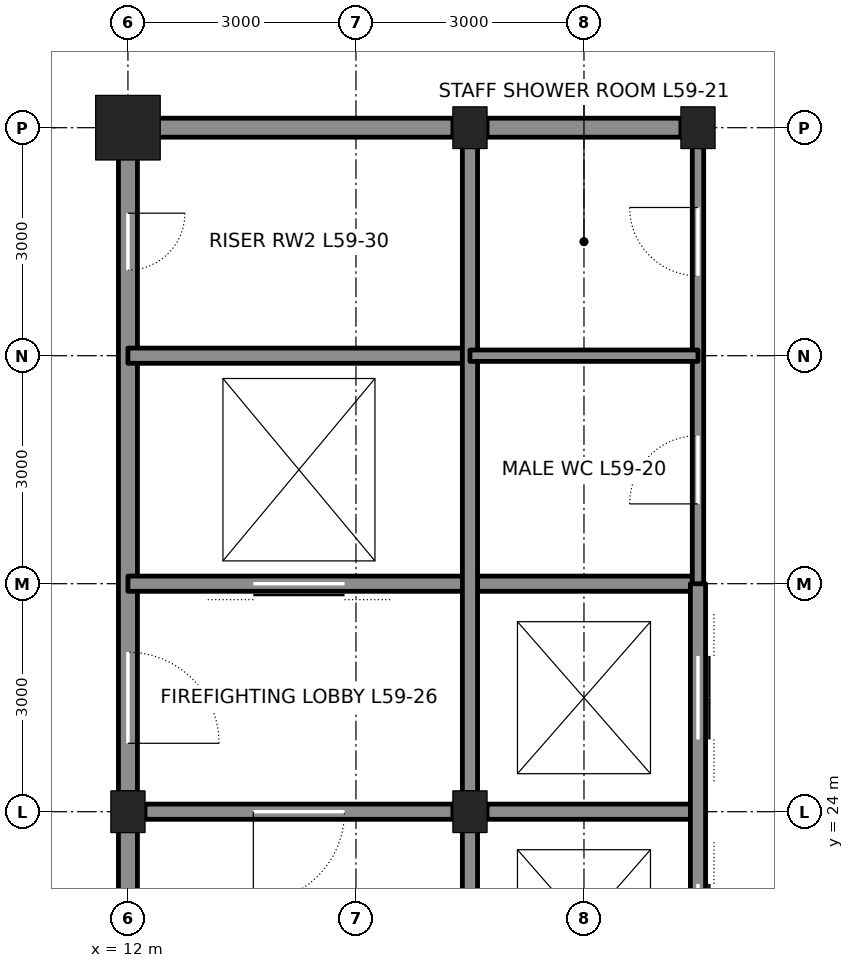
"""IFC4 building model, lengths in metres.
Left out: names, types, materials, properties, quantities, classifications, styles, units other than length and angle.
Written with IfcOpenShell. Run it as: python <this file> out.ifc"""

import sys

from ifc_helpers import new_model, si_unit, direction, frame, frame_2d, origin, origin_2d, place, context, subcontext, project, spatial, rectangle, hollow_rectangle, i_section, extrude, element, fill, save


model = new_model("IFC4")
c1 = context("Model", 3, precision=1e-05, world=origin(), true_north=direction((0.0, 1.0)))
c2 = subcontext(c1, "Body", "Model", "MODEL_VIEW")
j1 = project(units=[si_unit("LENGTHUNIT", "METRE"), si_unit("PLANEANGLEUNIT", "RADIAN")], contexts=[c1])
p1 = place(None, origin())
s1 = spatial("IfcSite", under=j1, at=p1, CompositionType="ELEMENT")
p2 = place(p1, origin())
s2 = spatial("IfcBuilding", under=s1, at=p2, CompositionType="ELEMENT")
p3 = place(p2, frame((0.0, 0.0, 266.4)))
s3 = spatial("IfcBuildingStorey", under=s2, at=p3, CompositionType="ELEMENT", Elevation=266.4)
p4 = place(p3, frame((12.0, 33.0, 0.0), z_axis=(0.0, 0.0, 1.0), x_axis=(1.0, 0.0, 0.0)))
e1 = element("IfcColumn", 1, at=p4, inside=s3, PredefinedType="COLUMN", context=c2, shape_type="SweptSolid", body=[
    extrude(hollow_rectangle(XDim=0.85, YDim=0.85, WallThickness=0.085, at=origin_2d()), origin(), (0.0, 0.0, 1.0), 4.2),
])
for number, where, z_axis, x_axis in (
    (2, (16.5, 33.0, 0.0), (0.0, 0.0, 1.0), (1.0, 0.0, 0.0)),
    (3, (19.5, 33.0, 0.0), (0.0, 0.0, 1.0), (1.0, 0.0, 0.0)),
    (4, (12.0, 24.0, 0.0), (0.0, 0.0, 1.0), (1.0, 0.0, 0.0)),
    (5, (16.5, 24.0, 0.0), (0.0, 0.0, 1.0), (1.0, 0.0, 0.0)),
):
    element("IfcColumn", number, at=place(p3, frame(where, z_axis=z_axis, x_axis=x_axis)), inside=s3, PredefinedType="COLUMN", context=c2, shape_type="SweptSolid", body=[
        extrude(i_section(OverallWidth=0.449, OverallDepth=0.549, WebThickness=0.072, FlangeThickness=0.115, at=origin_2d()), origin(), (0.0, 0.0, 1.0), 4.2),
    ])
p5 = place(p3, frame((12.0, 21.25, 0.0), z_axis=(0.0, 0.0, 1.0), x_axis=(0.0, 1.0, 0.0)))
e6 = element("IfcWall", 6, at=p5, inside=s3, PredefinedType="SOLIDWALL", context=c2, shape_type="SweptSolid", body=[
    extrude(rectangle(XDim=2.5, YDim=0.25, at=frame_2d((1.25, 0.0))), origin(), (0.0, 0.0, 1.0), 3.113),
])
p6 = place(p3, frame((12.0, 24.25, 0.0), z_axis=(0.0, 0.0, 1.0), x_axis=(0.0, 1.0, 0.0)))
e7 = element("IfcWall", 7, at=p6, inside=s3, PredefinedType="SOLIDWALL", context=c2, shape_type="SweptSolid", body=[
    extrude(rectangle(XDim=8.5, YDim=0.25, at=frame_2d((4.25, 0.0))), origin(), (0.0, 0.0, 1.0), 3.113),
])
p7 = place(p6, frame((0.65, 0.0, 0.0)))
e8 = element("IfcOpeningElement", 8, at=p7, cuts=e7, PredefinedType="OPENING", context=c2, shape_type="SweptSolid", body=[
    extrude(rectangle(XDim=1.2, YDim=2.1, at=frame_2d((0.6, 1.05))), frame((0.0, 0.135, 0.0), z_axis=(0.0, -1.0, 0.0), x_axis=(1.0, 0.0, 0.0)), (0.0, 0.0, 1.0), 0.27),
])
p8 = place(p6, frame((6.875, 0.0, 0.0)))
e9 = element("IfcOpeningElement", 9, at=p8, cuts=e7, PredefinedType="OPENING", context=c2, shape_type="SweptSolid", body=[
    extrude(rectangle(XDim=0.75, YDim=2.1, at=frame_2d((0.375, 1.05))), frame((0.0, 0.135, 0.0), z_axis=(0.0, -1.0, 0.0), x_axis=(1.0, 0.0, 0.0)), (0.0, 0.0, 1.0), 0.27),
])
p9 = place(p3, frame((12.225, 24.0, 0.0), z_axis=(0.0, 0.0, 1.0), x_axis=(1.0, 0.0, 0.0)))
e10 = element("IfcWall", 10, at=p9, inside=s3, PredefinedType="SOLIDWALL", context=c2, shape_type="SweptSolid", body=[
    extrude(rectangle(XDim=4.05, YDim=0.2, at=frame_2d((2.025, 0.0))), origin(), (0.0, 0.0, 1.0), 3.09),
])
p10 = place(p9, frame((1.425, 0.0, 0.0)))
e11 = element("IfcOpeningElement", 11, at=p10, cuts=e10, PredefinedType="OPENING", context=c2, shape_type="SweptSolid", body=[
    extrude(rectangle(XDim=1.2, YDim=2.1, at=frame_2d((0.6, 1.05))), frame((0.0, 0.11, 0.0), z_axis=(0.0, -1.0, 0.0), x_axis=(1.0, 0.0, 0.0)), (0.0, 0.0, 1.0), 0.22),
])
p11 = place(p3, frame((16.725, 24.0, 0.0), z_axis=(0.0, 0.0, 1.0), x_axis=(1.0, 0.0, 0.0)))
e12 = element("IfcWall", 12, at=p11, inside=s3, PredefinedType="SOLIDWALL", context=c2, shape_type="SweptSolid", body=[
    extrude(rectangle(XDim=2.775, YDim=0.2, at=frame_2d((1.388, 0.0))), origin(), (0.0, 0.0, 1.0), 3.09),
])
p12 = place(p3, frame((12.0, 27.0, 0.0), z_axis=(0.0, 0.0, 1.0), x_axis=(1.0, 0.0, 0.0)))
e13 = element("IfcWall", 13, at=p12, inside=s3, PredefinedType="SOLIDWALL", context=c2, shape_type="SweptSolid", body=[
    extrude(rectangle(XDim=7.5, YDim=0.2, at=frame_2d((3.75, 0.0))), origin(), (0.0, 0.0, 1.0), 4.04),
])
p13 = place(p12, frame((1.65, 0.0, 0.0)))
e14 = element("IfcOpeningElement", 14, at=p13, cuts=e13, PredefinedType="OPENING", context=c2, shape_type="SweptSolid", body=[
    extrude(rectangle(XDim=1.2, YDim=2.1, at=frame_2d((0.6, 1.05))), frame((0.0, 0.11, 0.0), z_axis=(0.0, -1.0, 0.0), x_axis=(1.0, 0.0, 0.0)), (0.0, 0.0, 1.0), 0.22),
])
p14 = place(p3, frame((12.0, 30.0, 0.0), z_axis=(0.0, 0.0, 1.0), x_axis=(1.0, 0.0, 0.0)))
e15 = element("IfcWall", 15, at=p14, inside=s3, PredefinedType="SOLIDWALL", context=c2, shape_type="SweptSolid", body=[
    extrude(rectangle(XDim=4.5, YDim=0.2, at=frame_2d((2.25, 0.0))), origin(), (0.0, 0.0, 1.0), 4.04),
])
p15 = place(p3, frame((12.25, 33.0, 0.0), z_axis=(0.0, 0.0, 1.0), x_axis=(1.0, 0.0, 0.0)))
e16 = element("IfcWall", 16, at=p15, inside=s3, PredefinedType="SOLIDWALL", context=c2, shape_type="SweptSolid", body=[
    extrude(rectangle(XDim=4.025, YDim=0.25, at=frame_2d((2.013, 0.0))), origin(), (0.0, 0.0, 1.0), 3.182),
])
p16 = place(p3, frame((16.725, 33.0, 0.0), z_axis=(0.0, 0.0, 1.0), x_axis=(1.0, 0.0, 0.0)))
e17 = element("IfcWall", 17, at=p16, inside=s3, PredefinedType="SOLIDWALL", context=c2, shape_type="SweptSolid", body=[
    extrude(rectangle(XDim=2.55, YDim=0.25, at=frame_2d((1.275, 0.0))), origin(), (0.0, 0.0, 1.0), 3.182),
])
p17 = place(p3, frame((16.5, 21.25, 0.0), z_axis=(0.0, 0.0, 1.0), x_axis=(0.0, 1.0, 0.0)))
e18 = element("IfcWall", 18, at=p17, inside=s3, PredefinedType="SOLIDWALL", context=c2, shape_type="SweptSolid", body=[
    extrude(rectangle(XDim=2.5, YDim=0.2, at=frame_2d((1.25, 0.0))), origin(), (0.0, 0.0, 1.0), 3.113),
])
p18 = place(p3, frame((16.5, 24.25, 0.0), z_axis=(0.0, 0.0, 1.0), x_axis=(0.0, 1.0, 0.0)))
e19 = element("IfcWall", 19, at=p18, inside=s3, PredefinedType="SOLIDWALL", context=c2, shape_type="SweptSolid", body=[
    extrude(rectangle(XDim=8.5, YDim=0.2, at=frame_2d((4.25, 0.0))), origin(), (0.0, 0.0, 1.0), 3.113),
])
p19 = place(p3, frame((19.5, 15.0, 0.0), z_axis=(0.0, 0.0, 1.0), x_axis=(0.0, 1.0, 0.0)))
e20 = element("IfcWall", 20, at=p19, inside=s3, PredefinedType="SOLIDWALL", context=c2, shape_type="SweptSolid", body=[
    extrude(rectangle(XDim=12.0, YDim=0.2, at=frame_2d((6.0, 0.0))), origin(), (0.0, 0.0, 1.0), 3.065),
])
p20 = place(p19, frame((0.95, 0.0, 0.0)))
e21 = element("IfcOpeningElement", 21, at=p20, cuts=e20, PredefinedType="OPENING", context=c2, shape_type="SweptSolid", body=[
    extrude(rectangle(XDim=1.1, YDim=2.1, at=frame_2d((0.55, 1.05))), frame((0.0, 0.11, 0.0), z_axis=(0.0, -1.0, 0.0), x_axis=(1.0, 0.0, 0.0)), (0.0, 0.0, 1.0), 0.22),
])
p21 = place(p19, frame((3.95, 0.0, 0.0)))
e22 = element("IfcOpeningElement", 22, at=p21, cuts=e20, PredefinedType="OPENING", context=c2, shape_type="SweptSolid", body=[
    extrude(rectangle(XDim=1.1, YDim=2.1, at=frame_2d((0.55, 1.05))), frame((0.0, 0.11, 0.0), z_axis=(0.0, -1.0, 0.0), x_axis=(1.0, 0.0, 0.0)), (0.0, 0.0, 1.0), 0.22),
])
p22 = place(p19, frame((6.95, 0.0, 0.0)))
e23 = element("IfcOpeningElement", 23, at=p22, cuts=e20, PredefinedType="OPENING", context=c2, shape_type="SweptSolid", body=[
    extrude(rectangle(XDim=1.1, YDim=2.1, at=frame_2d((0.55, 1.05))), frame((0.0, 0.11, 0.0), z_axis=(0.0, -1.0, 0.0), x_axis=(1.0, 0.0, 0.0)), (0.0, 0.0, 1.0), 0.22),
])
p23 = place(p19, frame((9.95, 0.0, 0.0)))
e24 = element("IfcOpeningElement", 24, at=p23, cuts=e20, PredefinedType="OPENING", context=c2, shape_type="SweptSolid", body=[
    extrude(rectangle(XDim=1.1, YDim=2.1, at=frame_2d((0.55, 1.05))), frame((0.0, 0.11, 0.0), z_axis=(0.0, -1.0, 0.0), x_axis=(1.0, 0.0, 0.0)), (0.0, 0.0, 1.0), 0.22),
])
p24 = place(p3, frame((19.5, 27.0, 0.0), z_axis=(0.0, 0.0, 1.0), x_axis=(0.0, 1.0, 0.0)))
e25 = element("IfcWall", 25, at=p24, inside=s3, PredefinedType="PARTITIONING", context=c2, shape_type="SweptSolid", body=[
    extrude(rectangle(XDim=5.75, YDim=0.15, at=frame_2d((2.875, 0.0))), origin(), (0.0, 0.0, 1.0), 3.065),
])
p25 = place(p24, frame((1.05, 0.0, 0.0)))
e26 = element("IfcOpeningElement", 26, at=p25, cuts=e25, PredefinedType="OPENING", context=c2, shape_type="SweptSolid", body=[
    extrude(rectangle(XDim=0.9, YDim=2.1, at=frame_2d((0.45, 1.05))), frame((0.0, 0.085, 0.0), z_axis=(0.0, -1.0, 0.0), x_axis=(1.0, 0.0, 0.0)), (0.0, 0.0, 1.0), 0.17),
])
p26 = place(p24, frame((4.05, 0.0, 0.0)))
e27 = element("IfcOpeningElement", 27, at=p26, cuts=e25, PredefinedType="OPENING", context=c2, shape_type="SweptSolid", body=[
    extrude(rectangle(XDim=0.9, YDim=2.1, at=frame_2d((0.45, 1.05))), frame((0.0, 0.085, 0.0), z_axis=(0.0, -1.0, 0.0), x_axis=(1.0, 0.0, 0.0)), (0.0, 0.0, 1.0), 0.17),
])
p27 = place(p3, frame((16.5, 30.0, 0.0), z_axis=(0.0, 0.0, 1.0), x_axis=(1.0, 0.0, 0.0)))
e28 = element("IfcWall", 28, at=p27, inside=s3, PredefinedType="PARTITIONING", context=c2, shape_type="SweptSolid", body=[
    extrude(rectangle(XDim=3.0, YDim=0.15, at=frame_2d((1.5, 0.0))), origin(), (0.0, 0.0, 1.0), 4.04),
])
p28 = place(p10, frame((1.2, 0.0, 0.0), z_axis=(0.0, 0.0, 1.0), x_axis=(-1.0, 0.0, 0.0)))
e29 = element("IfcDoor", 29, at=p28, inside=s3, OperationType="SINGLE_SWING_RIGHT", PredefinedType="DOOR", context=c2, shape_type="SweptSolid", body=[
    extrude(rectangle(XDim=1.2, YDim=2.1, at=frame_2d((0.6, 1.05))), frame((0.0, 0.025, 0.0), z_axis=(0.0, -1.0, 0.0), x_axis=(1.0, 0.0, 0.0)), (0.0, 0.0, 1.0), 0.05),
])
fill(e11, e29)
p29 = place(p7, frame((1.2, 0.0, 0.0), z_axis=(0.0, 0.0, 1.0), x_axis=(-1.0, 0.0, 0.0)))
e30 = element("IfcDoor", 30, at=p29, inside=s3, OperationType="SINGLE_SWING_RIGHT", PredefinedType="DOOR", context=c2, shape_type="SweptSolid", body=[
    extrude(rectangle(XDim=1.2, YDim=2.1, at=frame_2d((0.6, 1.05))), frame((0.0, 0.025, 0.0), z_axis=(0.0, -1.0, 0.0), x_axis=(1.0, 0.0, 0.0)), (0.0, 0.0, 1.0), 0.05),
])
fill(e8, e30)
p30 = place(p13, origin())
e31 = element("IfcDoor", 31, at=p30, inside=s3, OperationType="DOUBLE_DOOR_SLIDING", PredefinedType="DOOR", context=c2, shape_type="SweptSolid", body=[
    extrude(rectangle(XDim=1.2, YDim=2.1, at=frame_2d((0.6, 1.05))), frame((0.0, 0.025, 0.0), z_axis=(0.0, -1.0, 0.0), x_axis=(1.0, 0.0, 0.0)), (0.0, 0.0, 1.0), 0.05),
])
fill(e14, e31)
p31 = place(p8, frame((0.75, 0.0, 0.0), z_axis=(0.0, 0.0, 1.0), x_axis=(-1.0, 0.0, 0.0)))
e32 = element("IfcDoor", 32, at=p31, inside=s3, OperationType="SINGLE_SWING_LEFT", PredefinedType="DOOR", context=c2, shape_type="SweptSolid", body=[
    extrude(rectangle(XDim=0.75, YDim=2.1, at=frame_2d((0.375, 1.05))), frame((0.0, 0.025, 0.0), z_axis=(0.0, -1.0, 0.0), x_axis=(1.0, 0.0, 0.0)), (0.0, 0.0, 1.0), 0.05),
])
fill(e9, e32)
p32 = place(p25, origin())
e33 = element("IfcDoor", 33, at=p32, inside=s3, OperationType="SINGLE_SWING_LEFT", PredefinedType="DOOR", context=c2, shape_type="SweptSolid", body=[
    extrude(rectangle(XDim=0.9, YDim=2.1, at=frame_2d((0.45, 1.05))), frame((0.0, 0.025, 0.0), z_axis=(0.0, -1.0, 0.0), x_axis=(1.0, 0.0, 0.0)), (0.0, 0.0, 1.0), 0.05),
])
fill(e26, e33)
p33 = place(p26, origin())
e34 = element("IfcDoor", 34, at=p33, inside=s3, OperationType="SINGLE_SWING_RIGHT", PredefinedType="DOOR", context=c2, shape_type="SweptSolid", body=[
    extrude(rectangle(XDim=0.9, YDim=2.1, at=frame_2d((0.45, 1.05))), frame((0.0, 0.025, 0.0), z_axis=(0.0, -1.0, 0.0), x_axis=(1.0, 0.0, 0.0)), (0.0, 0.0, 1.0), 0.05),
])
fill(e27, e34)
p34 = place(p22, origin())
e35 = element("IfcDoor", 35, at=p34, inside=s3, OperationType="DOUBLE_DOOR_SLIDING", PredefinedType="DOOR", context=c2, shape_type="SweptSolid", body=[
    extrude(rectangle(XDim=1.1, YDim=2.1, at=frame_2d((0.55, 1.05))), frame((0.0, 0.025, 0.0), z_axis=(0.0, -1.0, 0.0), x_axis=(1.0, 0.0, 0.0)), (0.0, 0.0, 1.0), 0.05),
])
fill(e23, e35)
p35 = place(p23, origin())
e36 = element("IfcDoor", 36, at=p35, inside=s3, OperationType="DOUBLE_DOOR_SLIDING", PredefinedType="DOOR", context=c2, shape_type="SweptSolid", body=[
    extrude(rectangle(XDim=1.1, YDim=2.1, at=frame_2d((0.55, 1.05))), frame((0.0, 0.025, 0.0), z_axis=(0.0, -1.0, 0.0), x_axis=(1.0, 0.0, 0.0)), (0.0, 0.0, 1.0), 0.05),
])
fill(e24, e36)
save(model, sys.argv[1])
